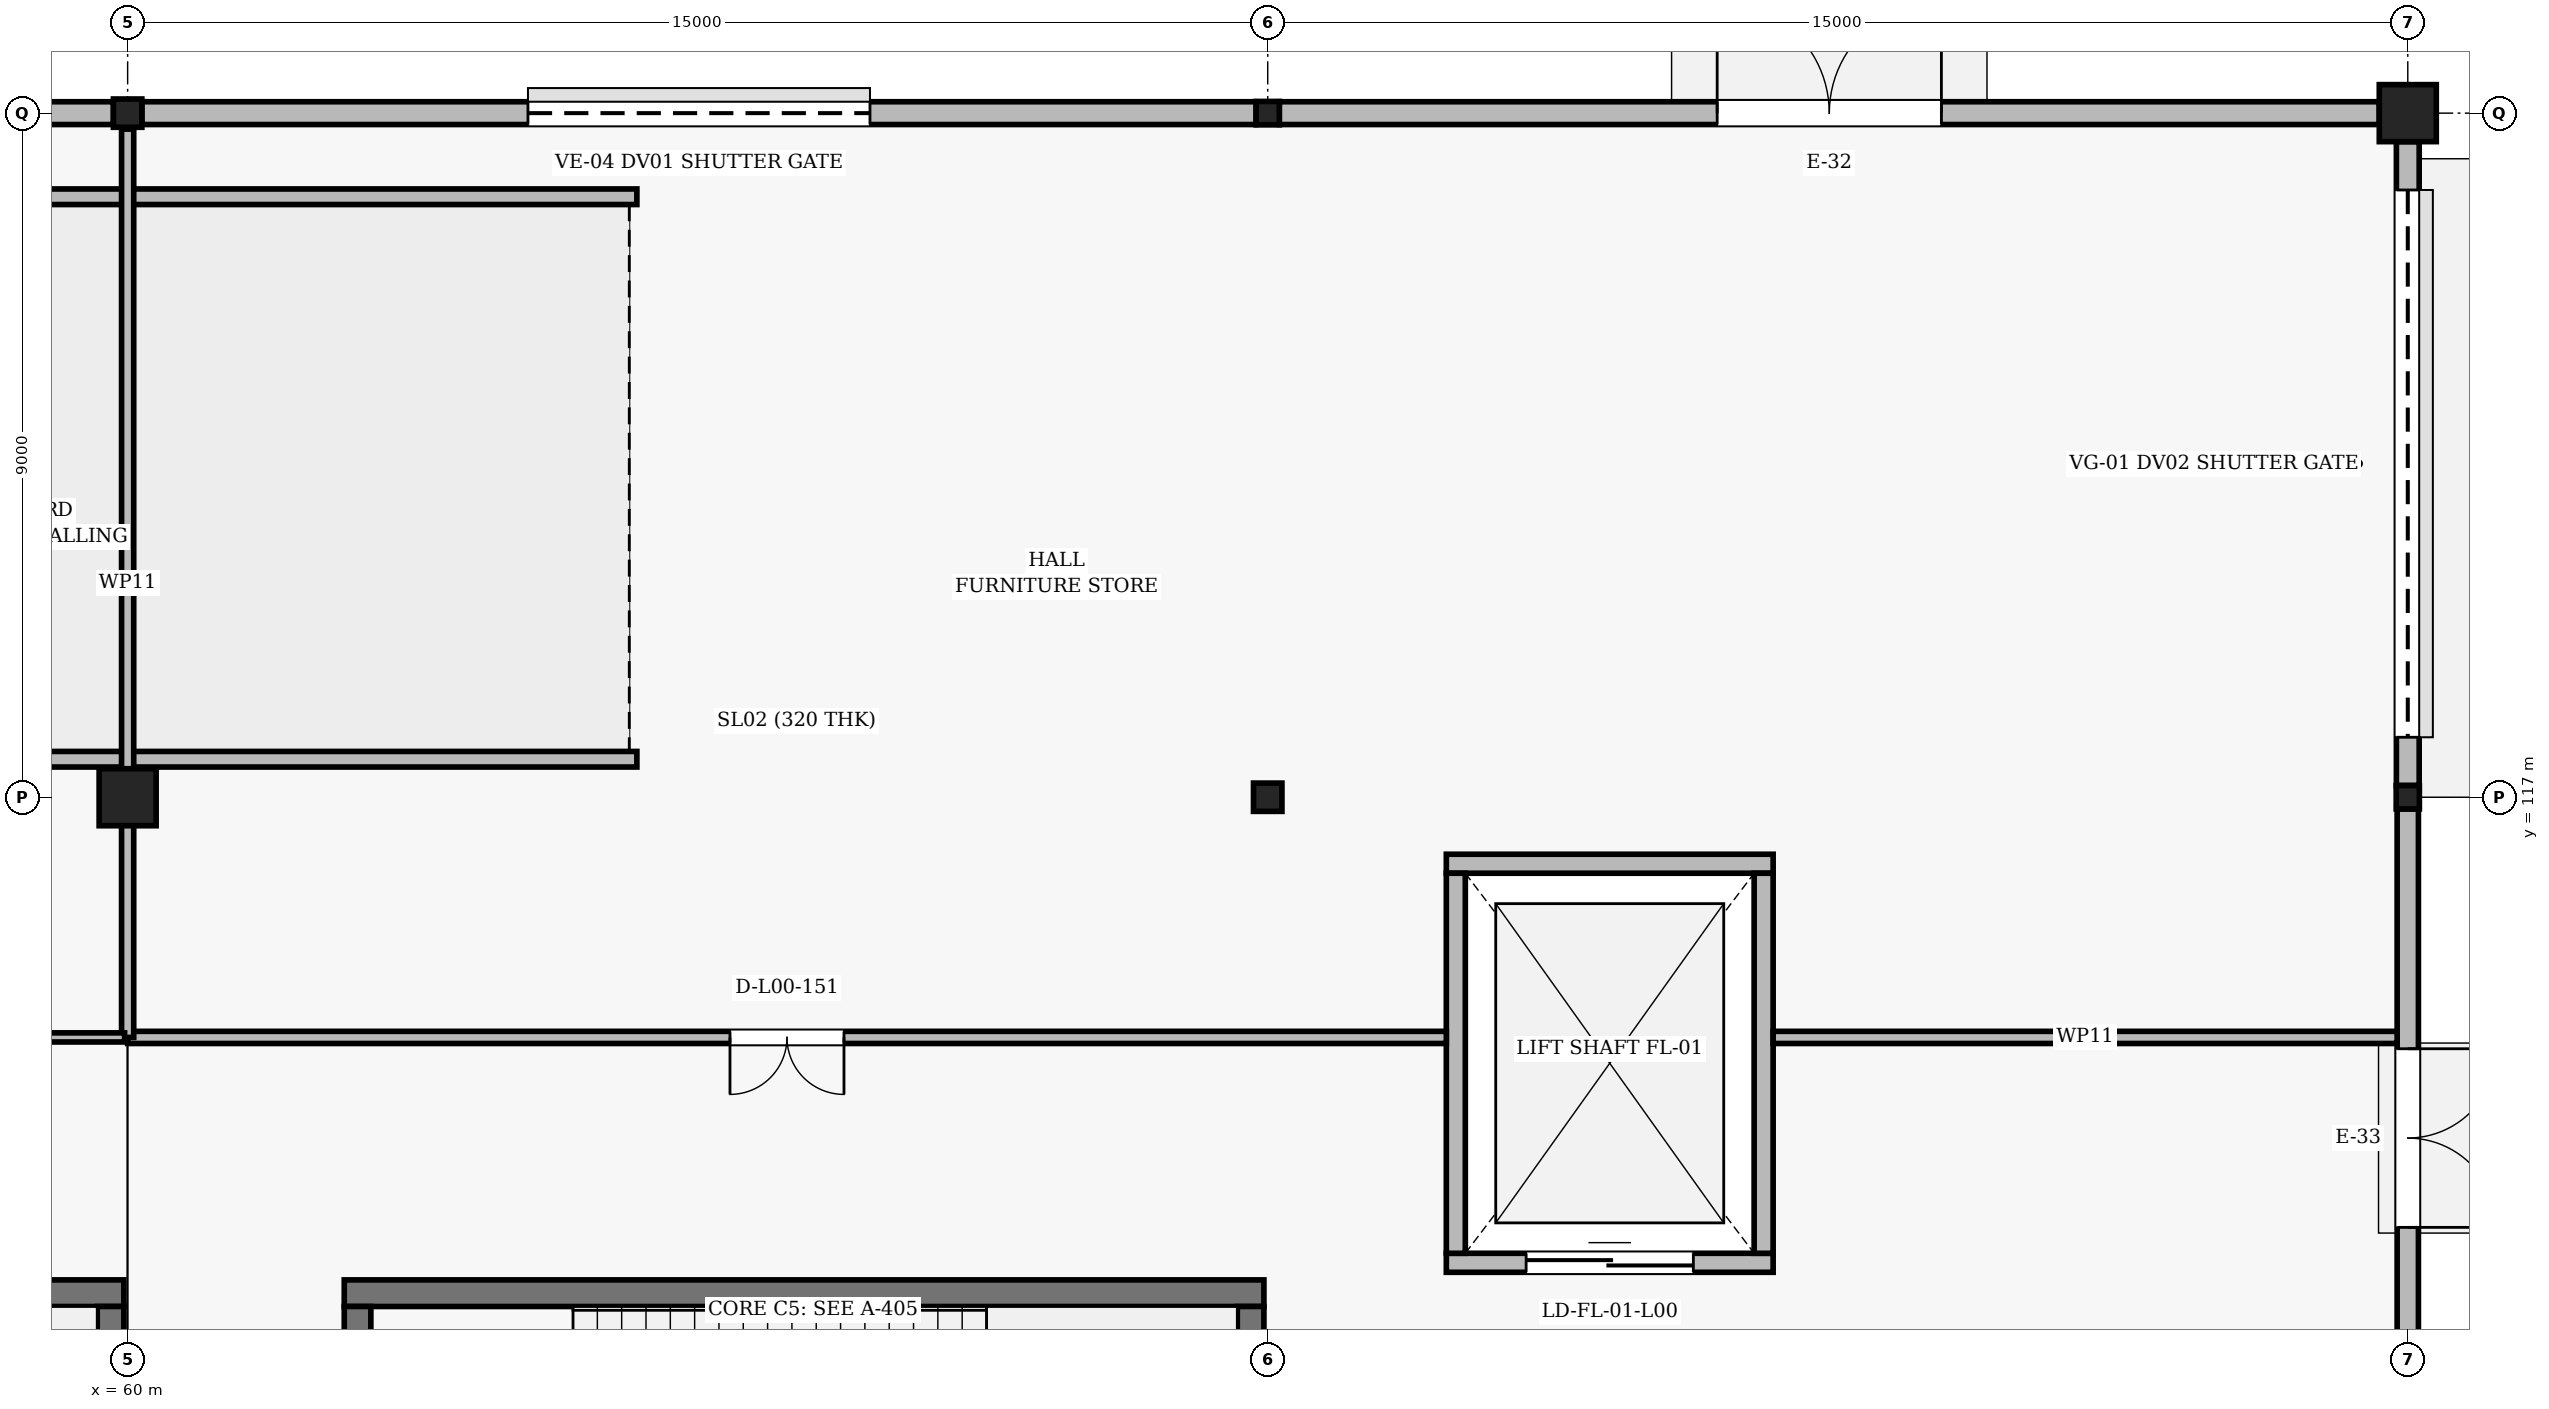
"""IFC4 building model, lengths in metres.
Left out: names, types, materials, properties, quantities, classifications, styles, units other than length and angle.
Written with IfcOpenShell. Run it as: python <this file> out.ifc"""

import sys

from ifc_helpers import new_model, si_unit, direction, frame, frame_2d, origin, origin_2d, place, context, subcontext, project, spatial, rectangle, i_section, extrude, element, fill, save


model = new_model("IFC4")
c1 = context("Model", 3, precision=1e-05, world=origin(), true_north=direction((0.0, 1.0)))
c2 = subcontext(c1, "Body", "Model", "MODEL_VIEW")
j1 = project(units=[si_unit("LENGTHUNIT", "METRE"), si_unit("PLANEANGLEUNIT", "RADIAN")], contexts=[c1])
p1 = place(None, origin())
s1 = spatial("IfcSite", under=j1, at=p1, CompositionType="ELEMENT")
p2 = place(p1, origin())
s2 = spatial("IfcBuilding", under=s1, at=p2, CompositionType="ELEMENT")
p3 = place(p2, origin())
s3 = spatial("IfcBuildingStorey", under=s2, at=p3, CompositionType="ELEMENT", Elevation=0.0)
p4 = place(p3, frame((60.0, 117.0, 0.0), z_axis=(0.0, 0.0, 1.0), x_axis=(1.0, 0.0, 0.0)))
e1 = element("IfcColumn", 1, at=p4, inside=s3, PredefinedType="COLUMN", context=c2, shape_type="SweptSolid", body=[
    extrude(rectangle(XDim=0.75, YDim=0.75, at=origin_2d()), origin(), (0.0, 0.0, 1.0), 5.4),
])
for number, where, z_axis, x_axis in (
    (2, (60.0, 126.0, 0.0), (0.0, 0.0, 1.0), (1.0, 0.0, 0.0)),
    (3, (75.0, 117.0, 0.0), (0.0, 0.0, 1.0), (1.0, 0.0, 0.0)),
):
    element("IfcColumn", number, at=place(p3, frame(where, z_axis=z_axis, x_axis=x_axis)), inside=s3, PredefinedType="COLUMN", context=c2, shape_type="SweptSolid", body=[
        extrude(i_section(OverallWidth=0.374, OverallDepth=0.372, WebThickness=0.016, FlangeThickness=0.026, FilletRadius=0.016, at=origin_2d()), origin(), (0.0, 0.0, 1.0), 5.4),
    ])
for number, where, z_axis, x_axis in (
    (4, (75.0, 126.0, 0.0), (0.0, 0.0, 1.0), (1.0, 0.0, 0.0)),
    (5, (90.0, 117.0, 0.0), (0.0, 0.0, 1.0), (1.0, 0.0, 0.0)),
):
    element("IfcColumn", number, at=place(p3, frame(where, z_axis=z_axis, x_axis=x_axis)), inside=s3, PredefinedType="COLUMN", context=c2, shape_type="SweptSolid", body=[
        extrude(i_section(OverallWidth=0.305, OverallDepth=0.308, WebThickness=0.01, FlangeThickness=0.015, FilletRadius=0.015, at=origin_2d()), origin(), (0.0, 0.0, 1.0), 5.4),
    ])
p5 = place(p3, frame((90.0, 126.0, 0.0), z_axis=(0.0, 0.0, 1.0), x_axis=(1.0, 0.0, 0.0)))
e6 = element("IfcColumn", 6, at=p5, inside=s3, PredefinedType="COLUMN", context=c2, shape_type="SweptSolid", body=[
    extrude(rectangle(XDim=0.75, YDim=0.75, at=origin_2d()), origin(), (0.0, 0.0, 1.0), 5.4),
])
p6 = place(p3, frame((45.375, 126.0, 0.0), z_axis=(0.0, 0.0, 1.0), x_axis=(1.0, 0.0, 0.0)))
e7 = element("IfcWall", 7, at=p6, inside=s3, PredefinedType="SOLIDWALL", context=c2, shape_type="SweptSolid", body=[
    extrude(rectangle(XDim=14.438, YDim=0.3, at=frame_2d((7.219, 0.0))), origin(), (0.0, 0.0, 1.0), 4.865),
])
p7 = place(p6, frame((4.969, 0.0, 0.0)))
e8 = element("IfcOpeningElement", 8, at=p7, cuts=e7, PredefinedType="OPENING", context=c2, shape_type="SweptSolid", body=[
    extrude(rectangle(XDim=4.5, YDim=4.4, at=frame_2d((2.25, 2.2))), frame((0.0, 0.16, 0.0), z_axis=(0.0, -1.0, 0.0), x_axis=(1.0, 0.0, 0.0)), (0.0, 0.0, 1.0), 0.32),
])
p8 = place(p3, frame((60.187, 126.0, 0.0), z_axis=(0.0, 0.0, 1.0), x_axis=(1.0, 0.0, 0.0)))
e9 = element("IfcWall", 9, at=p8, inside=s3, PredefinedType="SOLIDWALL", context=c2, shape_type="SweptSolid", body=[
    extrude(rectangle(XDim=14.66, YDim=0.3, at=frame_2d((7.33, 0.0))), origin(), (0.0, 0.0, 1.0), 4.626),
])
p9 = place(p8, frame((5.08, 0.0, 0.0)))
e10 = element("IfcOpeningElement", 10, at=p9, cuts=e9, PredefinedType="OPENING", context=c2, shape_type="SweptSolid", body=[
    extrude(rectangle(XDim=4.5, YDim=4.33, at=frame_2d((2.25, 2.165))), frame((0.0, 0.16, 0.0), z_axis=(0.0, -1.0, 0.0), x_axis=(1.0, 0.0, 0.0)), (0.0, 0.0, 1.0), 0.32),
])
p10 = place(p3, frame((75.153, 126.0, 0.0), z_axis=(0.0, 0.0, 1.0), x_axis=(1.0, 0.0, 0.0)))
e11 = element("IfcWall", 11, at=p10, inside=s3, PredefinedType="SOLIDWALL", context=c2, shape_type="SweptSolid", body=[
    extrude(rectangle(XDim=14.472, YDim=0.3, at=frame_2d((7.236, 0.0))), origin(), (0.0, 0.0, 1.0), 4.699),
])
p11 = place(p10, frame((5.761, 0.0, 0.0)))
e12 = element("IfcOpeningElement", 12, at=p11, cuts=e11, PredefinedType="OPENING", context=c2, shape_type="SweptSolid", body=[
    extrude(rectangle(XDim=2.95, YDim=2.68, at=frame_2d((1.475, 1.34))), frame((0.0, 0.16, 0.0), z_axis=(0.0, -1.0, 0.0), x_axis=(1.0, 0.0, 0.0)), (0.0, 0.0, 1.0), 0.32),
])
p12 = place(p3, frame((90.0, 125.625, 0.0), z_axis=(0.0, 0.0, 1.0), x_axis=(0.0, -1.0, 0.0)))
e13 = element("IfcWall", 13, at=p12, inside=s3, PredefinedType="SOLIDWALL", context=c2, shape_type="SweptSolid", body=[
    extrude(rectangle(XDim=8.471, YDim=0.3, at=frame_2d((4.235, 0.0))), origin(), (0.0, 0.0, 1.0), 4.481),
])
p13 = place(p12, frame((0.636, 0.0, 0.0)))
e14 = element("IfcOpeningElement", 14, at=p13, cuts=e13, PredefinedType="OPENING", context=c2, shape_type="SweptSolid", body=[
    extrude(rectangle(XDim=7.2, YDim=3.6, at=frame_2d((3.6, 1.8))), frame((0.0, 0.16, 0.0), z_axis=(0.0, -1.0, 0.0), x_axis=(1.0, 0.0, 0.0)), (0.0, 0.0, 1.0), 0.32),
])
p14 = place(p3, frame((90.0, 116.846, 0.0), z_axis=(0.0, 0.0, 1.0), x_axis=(0.0, -1.0, 0.0)))
e15 = element("IfcWall", 15, at=p14, inside=s3, PredefinedType="SOLIDWALL", context=c2, shape_type="SweptSolid", body=[
    extrude(rectangle(XDim=8.66, YDim=0.28, at=frame_2d((4.33, 0.0))), origin(), (0.0, 0.0, 1.0), 4.47),
])
p15 = place(p14, frame((3.155, 0.0, 0.0)))
e16 = element("IfcOpeningElement", 16, at=p15, cuts=e15, PredefinedType="OPENING", context=c2, shape_type="SweptSolid", body=[
    extrude(rectangle(XDim=2.35, YDim=2.38, at=frame_2d((1.175, 1.19))), frame((0.0, 0.15, 0.0), z_axis=(0.0, -1.0, 0.0), x_axis=(1.0, 0.0, 0.0)), (0.0, 0.0, 1.0), 0.3),
])
p16 = place(p3, frame((59.95, 110.475, 0.0), z_axis=(0.0, 0.0, 1.0), x_axis=(-1.0, 0.0, 0.0)))
e17 = element("IfcWall", 17, at=p16, inside=s3, PredefinedType="SHEAR", context=c2, shape_type="SweptSolid", body=[
    extrude(rectangle(XDim=12.1, YDim=0.35, at=frame_2d((6.05, 0.0))), origin(), (0.0, 0.0, 1.0), 5.18),
])
p17 = place(p3, frame((59.775, 104.8, 0.0), z_axis=(0.0, 0.0, 1.0), x_axis=(0.0, 1.0, 0.0)))
e18 = element("IfcWall", 18, at=p17, inside=s3, PredefinedType="SHEAR", context=c2, shape_type="SweptSolid", body=[
    extrude(rectangle(XDim=5.5, YDim=0.35, at=frame_2d((2.75, 0.0))), origin(), (0.0, 0.0, 1.0), 5.18),
])
p18 = place(p3, frame((74.95, 110.475, 0.0), z_axis=(0.0, 0.0, 1.0), x_axis=(-1.0, 0.0, 0.0)))
e19 = element("IfcWall", 19, at=p18, inside=s3, PredefinedType="SHEAR", context=c2, shape_type="SweptSolid", body=[
    extrude(rectangle(XDim=12.1, YDim=0.35, at=frame_2d((6.05, 0.0))), origin(), (0.0, 0.0, 1.0), 5.18),
])
p19 = place(p3, frame((63.025, 110.3, 0.0), z_axis=(0.0, 0.0, 1.0), x_axis=(0.0, -1.0, 0.0)))
e20 = element("IfcWall", 20, at=p19, inside=s3, PredefinedType="SHEAR", context=c2, shape_type="SweptSolid", body=[
    extrude(rectangle(XDim=5.5, YDim=0.35, at=frame_2d((2.75, 0.0))), origin(), (0.0, 0.0, 1.0), 5.18),
])
p20 = place(p19, frame((1.85, 0.0, 0.0)))
e21 = element("IfcOpeningElement", 21, at=p20, cuts=e20, PredefinedType="OPENING", context=c2, shape_type="SweptSolid", body=[
    extrude(rectangle(XDim=1.8, YDim=2.2, at=frame_2d((0.9, 1.1))), frame((0.0, 0.185, 0.0), z_axis=(0.0, -1.0, 0.0), x_axis=(1.0, 0.0, 0.0)), (0.0, 0.0, 1.0), 0.37),
])
p21 = place(p3, frame((74.775, 104.8, 0.0), z_axis=(0.0, 0.0, 1.0), x_axis=(0.0, 1.0, 0.0)))
e22 = element("IfcWall", 22, at=p21, inside=s3, PredefinedType="SHEAR", context=c2, shape_type="SweptSolid", body=[
    extrude(rectangle(XDim=5.5, YDim=0.35, at=frame_2d((2.75, 0.0))), origin(), (0.0, 0.0, 1.0), 5.18),
])
p22 = place(p3, frame((77.35, 110.875, 0.0), z_axis=(0.0, 0.0, 1.0), x_axis=(1.0, 0.0, 0.0)))
e23 = element("IfcWall", 23, at=p22, inside=s3, PredefinedType="SOLIDWALL", context=c2, shape_type="SweptSolid", body=[
    extrude(rectangle(XDim=4.3, YDim=0.25, at=frame_2d((2.15, 0.0))), origin(), (0.0, 0.0, 1.0), 5.18),
])
p23 = place(p22, frame((1.05, 0.0, 0.0)))
e24 = element("IfcOpeningElement", 24, at=p23, cuts=e23, PredefinedType="OPENING", context=c2, shape_type="SweptSolid", body=[
    extrude(rectangle(XDim=2.2, YDim=2.5, at=frame_2d((1.1, 1.25))), frame((0.0, 0.135, 0.0), z_axis=(0.0, -1.0, 0.0), x_axis=(1.0, 0.0, 0.0)), (0.0, 0.0, 1.0), 0.27),
])
p24 = place(p3, frame((81.65, 116.125, 0.0), z_axis=(0.0, 0.0, 1.0), x_axis=(-1.0, 0.0, 0.0)))
e25 = element("IfcWall", 25, at=p24, inside=s3, PredefinedType="SOLIDWALL", context=c2, shape_type="SweptSolid", body=[
    extrude(rectangle(XDim=4.3, YDim=0.25, at=frame_2d((2.15, 0.0))), origin(), (0.0, 0.0, 1.0), 5.18),
])
for number, where, z_axis, x_axis in (
    (26, (77.475, 116.0, 0.0), (0.0, 0.0, 1.0), (0.0, -1.0, 0.0)),
    (27, (81.525, 111.0, 0.0), (0.0, 0.0, 1.0), (0.0, 1.0, 0.0)),
):
    element("IfcWall", number, at=place(p3, frame(where, z_axis=z_axis, x_axis=x_axis)), inside=s3, PredefinedType="SOLIDWALL", context=c2, shape_type="SweptSolid", body=[
        extrude(rectangle(XDim=5.0, YDim=0.25, at=frame_2d((2.5, 0.0))), origin(), (0.0, 0.0, 1.0), 5.18),
    ])
for number, where, z_axis, x_axis in (
    (28, (17.9, 117.5, 0.0), (0.0, 0.0, 1.0), (1.0, 0.0, 0.0)),
    (29, (66.7, 124.9, 0.0), (0.0, 0.0, 1.0), (-1.0, 0.0, 0.0)),
):
    element("IfcWall", number, at=place(p3, frame(where, z_axis=z_axis, x_axis=x_axis)), inside=s3, PredefinedType="PARAPET", context=c2, shape_type="SweptSolid", body=[
        extrude(rectangle(XDim=48.8, YDim=0.205, at=frame_2d((24.4, 0.0))), origin(), (0.0, 0.0, 1.0), 1.25),
    ])
p25 = place(p3, frame((89.86, 113.84, 0.0), z_axis=(0.0, 0.0, 1.0), x_axis=(-1.0, 0.0, 0.0)))
e30 = element("IfcWall", 30, at=p25, inside=s3, PredefinedType="PARTITIONING", context=c2, shape_type="SweptSolid", body=[
    extrude(rectangle(XDim=8.21, YDim=0.16, at=frame_2d((4.105, 0.0))), origin(), (0.0, 0.0, 1.0), 4.47),
])
p26 = place(p3, frame((77.35, 113.84, 0.0), z_axis=(0.0, 0.0, 1.0), x_axis=(-1.0, 0.0, 0.0)))
e31 = element("IfcWall", 31, at=p26, inside=s3, PredefinedType="PARTITIONING", context=c2, shape_type="SweptSolid", body=[
    extrude(rectangle(XDim=17.35, YDim=0.16, at=frame_2d((8.675, 0.0))), origin(), (0.0, 0.0, 1.0), 4.392),
])
p27 = place(p26, frame((7.925, 0.0, 0.0)))
e32 = element("IfcOpeningElement", 32, at=p27, cuts=e31, PredefinedType="OPENING", context=c2, shape_type="SweptSolid", body=[
    extrude(rectangle(XDim=1.5, YDim=2.25, at=frame_2d((0.75, 1.125))), frame((0.0, 0.09, 0.0), z_axis=(0.0, -1.0, 0.0), x_axis=(1.0, 0.0, 0.0)), (0.0, 0.0, 1.0), 0.18),
])
p28 = place(p3, frame((60.0, 113.84, 0.0), z_axis=(0.0, 0.0, 1.0), x_axis=(0.0, 1.0, 0.0)))
e33 = element("IfcWall", 33, at=p28, inside=s3, PredefinedType="PARTITIONING", context=c2, shape_type="SweptSolid", body=[
    extrude(rectangle(XDim=11.95, YDim=0.16, at=frame_2d((5.975, 0.0))), origin(), (0.0, 0.0, 1.0), 4.392),
])
p29 = place(p3, frame((15.14, 113.84, 0.0), z_axis=(0.0, 0.0, 1.0), x_axis=(1.0, 0.0, 0.0)))
e34 = element("IfcWall", 34, at=p29, inside=s3, PredefinedType="PARTITIONING", context=c2, shape_type="SweptSolid", body=[
    extrude(rectangle(XDim=44.82, YDim=0.12, at=frame_2d((22.41, 0.0))), origin(), (0.0, 0.0, 1.0), 4.392),
])
p30 = place(p29, frame((21.92, 0.0, 0.0)))
e35 = element("IfcOpeningElement", 35, at=p30, cuts=e34, PredefinedType="OPENING", context=c2, shape_type="SweptSolid", body=[
    extrude(rectangle(XDim=0.98, YDim=2.15, at=frame_2d((0.49, 1.075))), frame((0.0, 0.07, 0.0), z_axis=(0.0, -1.0, 0.0), x_axis=(1.0, 0.0, 0.0)), (0.0, 0.0, 1.0), 0.14),
])
p31 = place(p9, origin())
e36 = element("IfcDoor", 36, at=p31, inside=s3, OperationType="ROLLINGUP", PredefinedType="DOOR", context=c2, shape_type="SweptSolid", body=[
    extrude(rectangle(XDim=4.5, YDim=4.33, at=frame_2d((2.25, 2.165))), frame((0.0, 0.025, 0.0), z_axis=(0.0, -1.0, 0.0), x_axis=(1.0, 0.0, 0.0)), (0.0, 0.0, 1.0), 0.05),
])
fill(e10, e36)
p32 = place(p11, origin())
e37 = element("IfcDoor", 37, at=p32, inside=s3, OperationType="DOUBLE_DOOR_SINGLE_SWING", PredefinedType="DOOR", context=c2, shape_type="SweptSolid", body=[
    extrude(rectangle(XDim=2.95, YDim=2.68, at=frame_2d((1.475, 1.34))), frame((0.0, 0.025, 0.0), z_axis=(0.0, -1.0, 0.0), x_axis=(1.0, 0.0, 0.0)), (0.0, 0.0, 1.0), 0.05),
])
fill(e12, e37)
p33 = place(p13, origin())
e38 = element("IfcDoor", 38, at=p33, inside=s3, OperationType="ROLLINGUP", PredefinedType="DOOR", context=c2, shape_type="SweptSolid", body=[
    extrude(rectangle(XDim=7.2, YDim=3.6, at=frame_2d((3.6, 1.8))), frame((0.0, 0.025, 0.0), z_axis=(0.0, -1.0, 0.0), x_axis=(1.0, 0.0, 0.0)), (0.0, 0.0, 1.0), 0.05),
])
fill(e14, e38)
p34 = place(p15, origin())
e39 = element("IfcDoor", 39, at=p34, inside=s3, OperationType="DOUBLE_DOOR_SINGLE_SWING", PredefinedType="DOOR", context=c2, shape_type="SweptSolid", body=[
    extrude(rectangle(XDim=2.35, YDim=2.38, at=frame_2d((1.175, 1.19))), frame((0.0, 0.025, 0.0), z_axis=(0.0, -1.0, 0.0), x_axis=(1.0, 0.0, 0.0)), (0.0, 0.0, 1.0), 0.05),
])
fill(e16, e39)
p35 = place(p23, origin())
e40 = element("IfcDoor", 40, at=p35, inside=s3, OperationType="DOUBLE_DOOR_SLIDING", PredefinedType="DOOR", context=c2, shape_type="SweptSolid", body=[
    extrude(rectangle(XDim=2.2, YDim=2.5, at=frame_2d((1.1, 1.25))), frame((0.0, 0.025, 0.0), z_axis=(0.0, -1.0, 0.0), x_axis=(1.0, 0.0, 0.0)), (0.0, 0.0, 1.0), 0.05),
])
fill(e24, e40)
p36 = place(p27, origin())
e41 = element("IfcDoor", 41, at=p36, inside=s3, OperationType="DOUBLE_DOOR_SINGLE_SWING", PredefinedType="DOOR", context=c2, shape_type="SweptSolid", body=[
    extrude(rectangle(XDim=1.5, YDim=2.25, at=frame_2d((0.75, 1.125))), frame((0.0, 0.025, 0.0), z_axis=(0.0, -1.0, 0.0), x_axis=(1.0, 0.0, 0.0)), (0.0, 0.0, 1.0), 0.05),
])
fill(e32, e41)
save(model, sys.argv[1])
